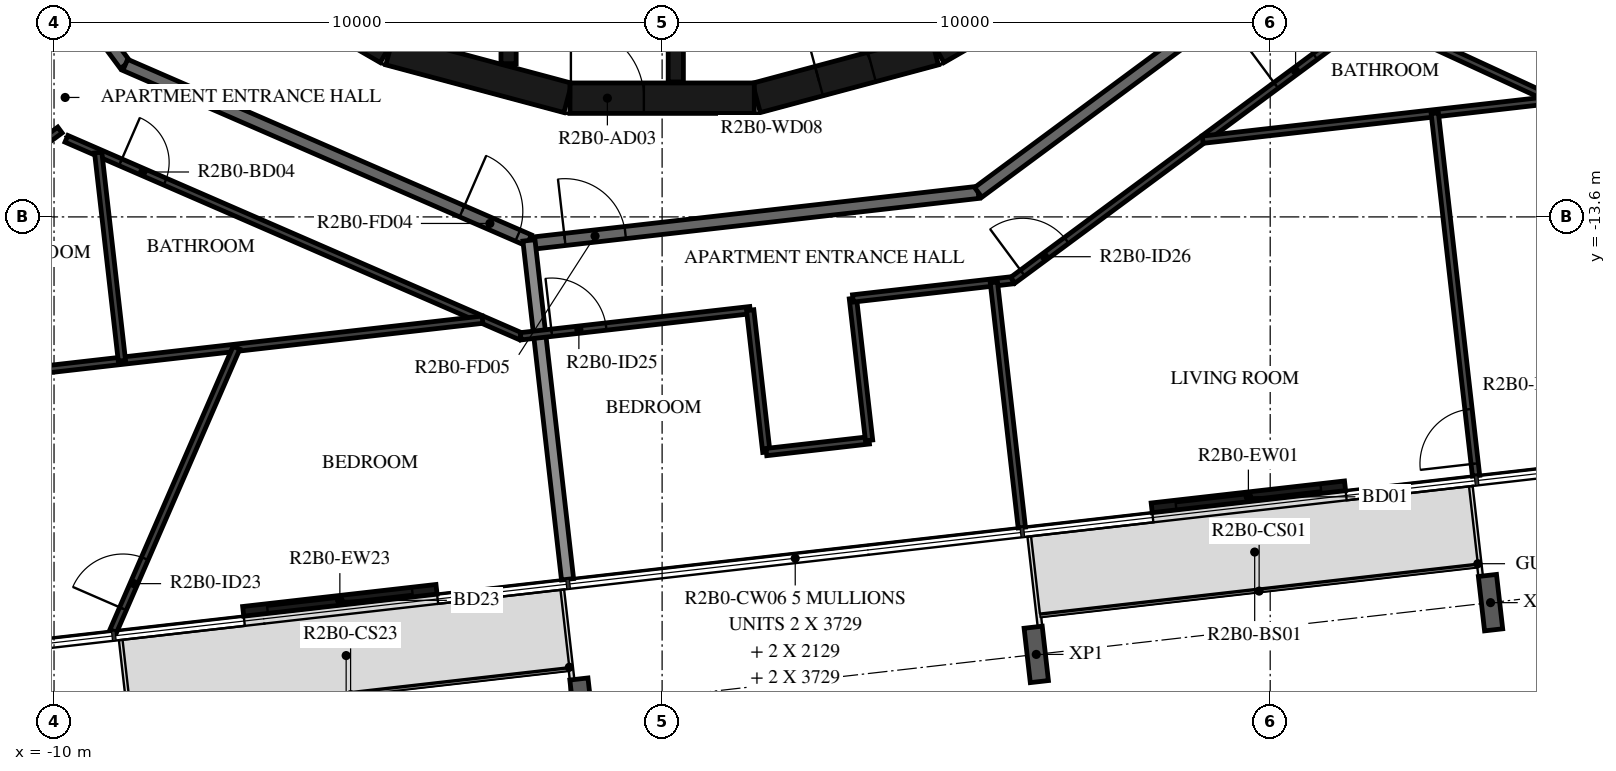
"""IFC4 building model, lengths in metres.
Left out: names, types, materials, properties, quantities, classifications, styles, units other than length and angle.
Written with IfcOpenShell. Run it as: python <this file> out.ifc"""

import sys

from ifc_helpers import new_model, si_unit, direction, frame, frame_2d, origin, origin_2d, place, context, subcontext, project, spatial, rectangle, i_section, extrude, element, fill, save


model = new_model("IFC4")
c1 = context("Model", 3, precision=1e-05, world=origin(), true_north=direction((0.0, 1.0)))
c2 = subcontext(c1, "Body", "Model", "MODEL_VIEW")
j1 = project(units=[si_unit("LENGTHUNIT", "METRE"), si_unit("PLANEANGLEUNIT", "RADIAN")], contexts=[c1])
p1 = place(None, origin())
s1 = spatial("IfcSite", under=j1, at=p1, CompositionType="ELEMENT")
p2 = place(p1, origin())
s2 = spatial("IfcBuilding", under=s1, at=p2, CompositionType="ELEMENT")
p3 = place(p2, frame((0.0, 0.0, 90.7)))
s3 = spatial("IfcBuildingStorey", under=s2, at=p3, CompositionType="ELEMENT", Elevation=90.7)
for number, where, z_axis, x_axis in (
    (1, (6.153, -20.795, -0.38), (0.0, 0.0, 1.0), (-0.994, -0.113, 0.0)),
    (2, (13.624, -19.944, -0.38), (0.0, 0.0, 1.0), (-0.994, -0.113, 0.0)),
    (3, (-1.317, -21.646, -0.38), (0.0, 0.0, 1.0), (-0.994, -0.113, 0.0)),
):
    element("IfcColumn", number, at=place(p3, frame(where, z_axis=z_axis, x_axis=x_axis)), inside=s3, PredefinedType="COLUMN", context=c2, shape_type="SweptSolid", body=[
        extrude(i_section(OverallWidth=0.3, OverallDepth=0.9, WebThickness=0.019, FlangeThickness=0.035, FilletRadius=0.03, at=origin_2d()), origin(), (0.0, 0.0, 1.0), 3.5),
    ])
p4 = place(p3, frame((-6.889, -20.086, 0.0), z_axis=(0.0, 0.0, 1.0), x_axis=(0.993578576686, 0.113144208648, 0.0)))
e4 = element("IfcWall", 4, at=p4, inside=s3, PredefinedType="STANDARD", context=c2, shape_type="SweptSolid", body=[
    extrude(rectangle(XDim=3.2, YDim=0.16, at=frame_2d((1.6, 0.0))), origin(), (0.0, 0.0, 1.0), 3.12),
])
p5 = place(p4, frame((0.4, 0.0, 0.0)))
e5 = element("IfcOpeningElement", 5, at=p5, cuts=e4, PredefinedType="OPENING", context=c2, shape_type="SweptSolid", body=[
    extrude(rectangle(XDim=2.4, YDim=2.4, at=frame_2d((1.2, 1.2))), frame((0.0, 0.09, 0.0), z_axis=(0.0, -1.0, 0.0), x_axis=(1.0, 0.0, 0.0)), (0.0, 0.0, 1.0), 0.18),
])
p6 = place(p3, frame((8.052, -18.384, 0.0), z_axis=(0.0, 0.0, 1.0), x_axis=(0.993569997097, 0.113219525124, 0.0)))
e6 = element("IfcWall", 6, at=p6, inside=s3, PredefinedType="STANDARD", context=c2, shape_type="SweptSolid", body=[
    extrude(rectangle(XDim=3.2, YDim=0.16, at=frame_2d((1.6, 0.0))), origin(), (0.0, 0.0, 1.0), 3.12),
])
p7 = place(p6, frame((0.4, 0.0, 0.0)))
e7 = element("IfcOpeningElement", 7, at=p7, cuts=e6, PredefinedType="OPENING", context=c2, shape_type="SweptSolid", body=[
    extrude(rectangle(XDim=2.4, YDim=2.4, at=frame_2d((1.2, 1.2))), frame((0.0, 0.09, 0.0), z_axis=(0.0, -1.0, 0.0), x_axis=(1.0, 0.0, 0.0)), (0.0, 0.0, 1.0), 0.18),
])
p8 = place(p3, frame((1.55, -11.643, 0.0), z_axis=(0.0, 0.0, 1.0), x_axis=(0.965948410781, 0.258734743916, 0.0)))
e8 = element("IfcWall", 8, at=p8, inside=s3, PredefinedType="SHEAR", context=c2, shape_type="SweptSolid", body=[
    extrude(rectangle(XDim=3.033, YDim=0.5, at=frame_2d((1.516, 0.0))), origin(), (0.0, 0.0, 1.0), 3.12),
])
p9 = place(p8, frame((1.066, 0.0, 0.0)))
e9 = element("IfcOpeningElement", 9, at=p9, cuts=e8, PredefinedType="OPENING", context=c2, shape_type="SweptSolid", body=[
    extrude(rectangle(XDim=0.9, YDim=2.1, at=frame_2d((0.45, 1.05))), frame((0.0, 0.26, 0.0), z_axis=(0.0, -1.0, 0.0), x_axis=(1.0, 0.0, 0.0)), (0.0, 0.0, 1.0), 0.52),
])
for number, where, z_axis, x_axis in (
    (10, (4.51, -10.845, 0.0), (0.0, 0.0, 1.0), (0.866, 0.5, 0.0)),
    (11, (-7.137, -9.329, 0.0), (0.0, 0.0, 1.0), (0.866, -0.5, 0.0)),
    (12, (-4.479, -10.858, 0.0), (0.0, 0.0, 1.0), (0.966, -0.259, 0.0)),
):
    element("IfcWall", number, at=place(p3, frame(where, z_axis=z_axis, x_axis=x_axis)), inside=s3, PredefinedType="SHEAR", context=c2, shape_type="SweptSolid", body=[
        extrude(rectangle(XDim=3.033, YDim=0.5, at=frame_2d((1.516, 0.0))), origin(), (0.0, 0.0, 1.0), 3.12),
    ])
p10 = place(p3, frame((-1.516, -11.647, 0.0), z_axis=(0.0, 0.0, 1.0), x_axis=(1.0, 0.0, 0.0)))
e13 = element("IfcWall", 13, at=p10, inside=s3, PredefinedType="SHEAR", context=c2, shape_type="SweptSolid", body=[
    extrude(rectangle(XDim=3.033, YDim=0.5, at=frame_2d((1.516, 0.0))), origin(), (0.0, 0.0, 1.0), 3.12),
])
p11 = place(p10, frame((0.016, 0.0, 0.0)))
e14 = element("IfcOpeningElement", 14, at=p11, cuts=e13, PredefinedType="OPENING", context=c2, shape_type="SweptSolid", body=[
    extrude(rectangle(XDim=1.2, YDim=2.1, at=frame_2d((0.6, 1.05))), frame((0.0, 0.26, 0.0), z_axis=(0.0, -1.0, 0.0), x_axis=(1.0, 0.0, 0.0)), (0.0, 0.0, 1.0), 0.52),
])
p12 = place(p3, frame((-2.525, -8.97, 0.0), z_axis=(0.0, 0.0, 1.0), x_axis=(0.0, -1.0, 0.0)))
e15 = element("IfcWall", 15, at=p12, inside=s3, PredefinedType="SHEAR", context=c2, shape_type="SweptSolid", body=[
    extrude(rectangle(XDim=2.11, YDim=0.25, at=frame_2d((1.055, 0.0))), origin(), (0.0, 0.0, 1.0), 3.12),
])
p13 = place(p3, frame((0.225, -8.97, 0.0), z_axis=(0.0, 0.0, 1.0), x_axis=(0.0, -1.0, 0.0)))
e16 = element("IfcWall", 16, at=p13, inside=s3, PredefinedType="SHEAR", context=c2, shape_type="SweptSolid", body=[
    extrude(rectangle(XDim=2.41, YDim=0.25, at=frame_2d((1.205, 0.0))), origin(), (0.0, 0.0, 1.0), 3.12),
])
p14 = place(p3, frame((-13.196, -5.198, 0.0), z_axis=(0.0, 0.0, 1.0), x_axis=(0.594805187394, -0.803869883159, 0.0)))
e17 = element("IfcWall", 17, at=p14, inside=s3, PredefinedType="STANDARD", context=c2, shape_type="SweptSolid", body=[
    extrude(rectangle(XDim=7.342, YDim=0.2, at=frame_2d((3.671, 0.0))), origin(), (0.0, 0.0, 1.0), 3.12),
])
p15 = place(p3, frame((-8.829, -11.1, 0.0), z_axis=(0.0, 0.0, 1.0), x_axis=(0.917063622491, -0.398740908742, 0.0)))
e18 = element("IfcWall", 18, at=p15, inside=s3, PredefinedType="STANDARD", context=c2, shape_type="SweptSolid", body=[
    extrude(rectangle(XDim=7.24, YDim=0.2, at=frame_2d((3.62, 0.0))), origin(), (0.0, 0.0, 1.0), 3.12),
])
p16 = place(p15, frame((6.04, 0.0, 0.0)))
e19 = element("IfcOpeningElement", 19, at=p16, cuts=e18, PredefinedType="OPENING", context=c2, shape_type="SweptSolid", body=[
    extrude(rectangle(XDim=1.0, YDim=2.1, at=frame_2d((0.5, 1.05))), frame((0.0, 0.11, 0.0), z_axis=(0.0, -1.0, 0.0), x_axis=(1.0, 0.0, 0.0)), (0.0, 0.0, 1.0), 0.22),
])
p17 = place(p3, frame((-2.096, -14.028, 0.0), z_axis=(0.0, 0.0, 1.0), x_axis=(0.993569170114, 0.113226782163, 0.0)))
e20 = element("IfcWall", 20, at=p17, inside=s3, PredefinedType="STANDARD", context=c2, shape_type="SweptSolid", body=[
    extrude(rectangle(XDim=7.342, YDim=0.2, at=frame_2d((3.671, 0.0))), origin(), (0.0, 0.0, 1.0), 3.12),
])
p18 = place(p17, frame((0.5, 0.0, 0.0)))
e21 = element("IfcOpeningElement", 21, at=p18, cuts=e20, PredefinedType="OPENING", context=c2, shape_type="SweptSolid", body=[
    extrude(rectangle(XDim=1.0, YDim=2.1, at=frame_2d((0.5, 1.05))), frame((0.0, 0.11, 0.0), z_axis=(0.0, -1.0, 0.0), x_axis=(1.0, 0.0, 0.0)), (0.0, 0.0, 1.0), 0.22),
])
p19 = place(p3, frame((5.198, -13.196, 0.0), z_axis=(0.0, 0.0, 1.0), x_axis=(0.803869883159, 0.594805187394, 0.0)))
e22 = element("IfcWall", 22, at=p19, inside=s3, PredefinedType="STANDARD", context=c2, shape_type="SweptSolid", body=[
    extrude(rectangle(XDim=7.342, YDim=0.2, at=frame_2d((3.671, 0.0))), origin(), (0.0, 0.0, 1.0), 3.12),
])
p20 = place(p3, frame((-1.555, -19.559, 0.0), z_axis=(0.0, 0.0, 1.0), x_axis=(-0.113221250863, 0.993569800443, 0.0)))
e23 = element("IfcWall", 23, at=p20, inside=s3, PredefinedType="STANDARD", context=c2, shape_type="SweptSolid", body=[
    extrude(rectangle(XDim=5.609, YDim=0.2, at=frame_2d((2.804, 0.0))), origin(), (0.0, 0.0, 1.0), 2.73),
])
p21 = place(p3, frame((-13.125, -14.555, 0.0), z_axis=(0.0, 0.0, 1.0), x_axis=(0.80389374229, 0.594772940799, 0.0)))
e24 = element("IfcWall", 24, at=p21, inside=s3, PredefinedType="PARTITIONING", context=c2, shape_type="SweptSolid", body=[
    extrude(rectangle(XDim=4.008, YDim=0.12, at=frame_2d((2.004, 0.0))), origin(), (0.0, 0.0, 1.0), 3.12),
])
p22 = place(p3, frame((-9.796, -12.315, 0.0), z_axis=(0.0, 0.0, 1.0), x_axis=(0.917059572812, -0.398750222463, 0.0)))
e25 = element("IfcWall", 25, at=p22, inside=s3, PredefinedType="PARTITIONING", context=c2, shape_type="SweptSolid", body=[
    extrude(rectangle(XDim=8.146, YDim=0.12, at=frame_2d((4.073, 0.0))), origin(), (0.0, 0.0, 1.0), 3.12),
])
p23 = place(p22, frame((0.969, 0.0, 0.0)))
e26 = element("IfcOpeningElement", 26, at=p23, cuts=e25, PredefinedType="OPENING", context=c2, shape_type="SweptSolid", body=[
    extrude(rectangle(XDim=0.8, YDim=2.1, at=frame_2d((0.4, 1.05))), frame((0.0, 0.07, 0.0), z_axis=(0.0, -1.0, 0.0), x_axis=(1.0, 0.0, 0.0)), (0.0, 0.0, 1.0), 0.14),
])
p24 = place(p3, frame((-2.326, -15.563, 0.0), z_axis=(0.0, 0.0, 1.0), x_axis=(0.993575068384, 0.113175012641, 0.0)))
e27 = element("IfcWall", 27, at=p24, inside=s3, PredefinedType="PARTITIONING", context=c2, shape_type="SweptSolid", body=[
    extrude(rectangle(XDim=3.799, YDim=0.12, at=frame_2d((1.899, 0.0))), origin(), (0.0, 0.0, 1.0), 3.12),
])
p25 = place(p24, frame((0.513, 0.0, 0.0)))
e28 = element("IfcOpeningElement", 28, at=p25, cuts=e27, PredefinedType="OPENING", context=c2, shape_type="SweptSolid", body=[
    extrude(rectangle(XDim=0.9, YDim=2.1, at=frame_2d((0.45, 1.05))), frame((0.0, 0.07, 0.0), z_axis=(0.0, -1.0, 0.0), x_axis=(1.0, 0.0, 0.0)), (0.0, 0.0, 1.0), 0.14),
])
p26 = place(p3, frame((-17.437, -16.94, 0.0), z_axis=(0.0, 0.0, 1.0), x_axis=(0.993573314119, 0.113190412448, 0.0)))
e29 = element("IfcWall", 29, at=p26, inside=s3, PredefinedType="PARTITIONING", context=c2, shape_type="SweptSolid", body=[
    extrude(rectangle(XDim=14.576, YDim=0.12, at=frame_2d((7.288, 0.0))), origin(), (0.0, 0.0, 1.0), 3.12),
])
p27 = place(p26, frame((3.201, 0.0, 0.0)))
e30 = element("IfcOpeningElement", 30, at=p27, cuts=e29, PredefinedType="OPENING", context=c2, shape_type="SweptSolid", body=[
    extrude(rectangle(XDim=0.9, YDim=2.1, at=frame_2d((0.45, 1.05))), frame((0.0, 0.07, 0.0), z_axis=(0.0, -1.0, 0.0), x_axis=(1.0, 0.0, 0.0)), (0.0, 0.0, 1.0), 0.14),
])
p28 = place(p26, frame((0.2, 0.0, 0.0)))
e31 = element("IfcOpeningElement", 31, at=p28, cuts=e29, PredefinedType="OPENING", context=c2, shape_type="SweptSolid", body=[
    extrude(rectangle(XDim=0.9, YDim=2.1, at=frame_2d((0.45, 1.05))), frame((0.0, 0.07, 0.0), z_axis=(0.0, -1.0, 0.0), x_axis=(1.0, 0.0, 0.0)), (0.0, 0.0, 1.0), 0.14),
])
p29 = place(p3, frame((-8.884, -15.966, 0.0), z_axis=(0.0, 0.0, 1.0), x_axis=(-0.113230836929, 0.993568708026, 0.0)))
e32 = element("IfcWall", 32, at=p29, inside=s3, PredefinedType="PARTITIONING", context=c2, shape_type="SweptSolid", body=[
    extrude(rectangle(XDim=3.446, YDim=0.12, at=frame_2d((1.723, 0.0))), origin(), (0.0, 0.0, 1.0), 3.12),
])
p30 = place(p3, frame((-9.026, -20.41, 0.0), z_axis=(0.0, 0.0, 1.0), x_axis=(0.398750711167, 0.917059360316, 0.0)))
e33 = element("IfcWall", 33, at=p30, inside=s3, PredefinedType="PARTITIONING", context=c2, shape_type="SweptSolid", body=[
    extrude(rectangle(XDim=5.081, YDim=0.12, at=frame_2d((2.54, 0.0))), origin(), (0.0, 0.0, 1.0), 3.12),
])
p31 = place(p30, frame((0.4, 0.0, 0.0)))
e34 = element("IfcOpeningElement", 34, at=p31, cuts=e33, PredefinedType="OPENING", context=c2, shape_type="SweptSolid", body=[
    extrude(rectangle(XDim=0.9, YDim=2.1, at=frame_2d((0.45, 1.05))), frame((0.0, 0.07, 0.0), z_axis=(0.0, -1.0, 0.0), x_axis=(1.0, 0.0, 0.0)), (0.0, 0.0, 1.0), 0.14),
])
p32 = place(p3, frame((1.448, -15.133, 0.0), z_axis=(0.0, 0.0, 1.0), x_axis=(0.113180189053, -0.993574478741, 0.0)))
e35 = element("IfcWall", 35, at=p32, inside=s3, PredefinedType="PARTITIONING", context=c2, shape_type="SweptSolid", body=[
    extrude(rectangle(XDim=2.349, YDim=0.12, at=frame_2d((1.175, 0.0))), origin(), (0.0, 0.0, 1.0), 3.12),
])
p33 = place(p3, frame((1.714, -17.467, 0.0), z_axis=(0.0, 0.0, 1.0), x_axis=(0.993577030812, 0.113157782957, 0.0)))
e36 = element("IfcWall", 36, at=p33, inside=s3, PredefinedType="PARTITIONING", context=c2, shape_type="SweptSolid", body=[
    extrude(rectangle(XDim=1.7, YDim=0.12, at=frame_2d((0.85, 0.0))), origin(), (0.0, 0.0, 1.0), 3.12),
])
p34 = place(p3, frame((3.404, -17.275, 0.0), z_axis=(0.0, 0.0, 1.0), x_axis=(-0.113180189053, 0.993574478741, 0.0)))
e37 = element("IfcWall", 37, at=p34, inside=s3, PredefinedType="PARTITIONING", context=c2, shape_type="SweptSolid", body=[
    extrude(rectangle(XDim=2.349, YDim=0.12, at=frame_2d((1.175, 0.0))), origin(), (0.0, 0.0, 1.0), 3.12),
])
p35 = place(p3, frame((3.138, -14.941, 0.0), z_axis=(0.0, 0.0, 1.0), x_axis=(0.99356355736, 0.113276023437, 0.0)))
e38 = element("IfcWall", 38, at=p35, inside=s3, PredefinedType="PARTITIONING", context=c2, shape_type="SweptSolid", body=[
    extrude(rectangle(XDim=2.647, YDim=0.12, at=frame_2d((1.323, 0.0))), origin(), (0.0, 0.0, 1.0), 3.12),
])
p36 = place(p3, frame((5.767, -14.641, 0.0), z_axis=(0.0, 0.0, 1.0), x_axis=(0.803867427863, 0.594808505673, 0.0)))
e39 = element("IfcWall", 39, at=p36, inside=s3, PredefinedType="PARTITIONING", context=c2, shape_type="SweptSolid", body=[
    extrude(rectangle(XDim=7.316, YDim=0.12, at=frame_2d((3.658, 0.0))), origin(), (0.0, 0.0, 1.0), 3.12),
])
p37 = place(p36, frame((0.2, 0.0, 0.0)))
e40 = element("IfcOpeningElement", 40, at=p37, cuts=e39, PredefinedType="OPENING", context=c2, shape_type="SweptSolid", body=[
    extrude(rectangle(XDim=0.9, YDim=2.1, at=frame_2d((0.45, 1.05))), frame((0.0, 0.07, 0.0), z_axis=(0.0, -1.0, 0.0), x_axis=(1.0, 0.0, 0.0)), (0.0, 0.0, 1.0), 0.14),
])
p38 = place(p36, frame((5.385, 0.0, 0.0)))
e41 = element("IfcOpeningElement", 41, at=p38, cuts=e39, PredefinedType="OPENING", context=c2, shape_type="SweptSolid", body=[
    extrude(rectangle(XDim=0.8, YDim=2.1, at=frame_2d((0.4, 1.05))), frame((0.0, 0.07, 0.0), z_axis=(0.0, -1.0, 0.0), x_axis=(1.0, 0.0, 0.0)), (0.0, 0.0, 1.0), 0.14),
])
p39 = place(p3, frame((11.649, -10.289, 0.0), z_axis=(0.0, 0.0, 1.0), x_axis=(0.9079269461, -0.419128453514, 0.0)))
e42 = element("IfcWall", 42, at=p39, inside=s3, PredefinedType="PARTITIONING", context=c2, shape_type="SweptSolid", body=[
    extrude(rectangle(XDim=3.304, YDim=0.12, at=frame_2d((1.652, 0.0))), origin(), (0.0, 0.0, 1.0), 3.12),
])
p40 = place(p3, frame((5.915, -18.708, 0.0), z_axis=(0.0, 0.0, 1.0), x_axis=(-0.113244511591, 0.993567149515, 0.0)))
e43 = element("IfcWall", 43, at=p40, inside=s3, PredefinedType="PARTITIONING", context=c2, shape_type="SweptSolid", body=[
    extrude(rectangle(XDim=4.057, YDim=0.12, at=frame_2d((2.029, 0.0))), origin(), (0.0, 0.0, 1.0), 2.73),
])
p41 = place(p3, frame((14.649, -11.674, 0.0), z_axis=(0.0, 0.0, 1.0), x_axis=(-0.993573746873, -0.113186613721, 0.0)))
e44 = element("IfcWall", 44, at=p41, inside=s3, PredefinedType="PARTITIONING", context=c2, shape_type="SweptSolid", body=[
    extrude(rectangle(XDim=5.796, YDim=0.12, at=frame_2d((2.898, 0.0))), origin(), (0.0, 0.0, 1.0), 3.12),
])
p42 = place(p3, frame((13.386, -17.857, 0.0), z_axis=(0.0, 0.0, 1.0), x_axis=(-0.113200012983, 0.993572220355, 0.0)))
e45 = element("IfcWall", 45, at=p42, inside=s3, PredefinedType="PARTITIONING", context=c2, shape_type="SweptSolid", body=[
    extrude(rectangle(XDim=6.0, YDim=0.12, at=frame_2d((3.0, 0.0))), origin(), (0.0, 0.0, 1.0), 2.73),
])
p43 = place(p42, frame((0.2, 0.0, 0.0)))
e46 = element("IfcOpeningElement", 46, at=p43, cuts=e45, PredefinedType="OPENING", context=c2, shape_type="SweptSolid", body=[
    extrude(rectangle(XDim=0.9, YDim=2.1, at=frame_2d((0.45, 1.05))), frame((0.0, 0.07, 0.0), z_axis=(0.0, -1.0, 0.0), x_axis=(1.0, 0.0, 0.0)), (0.0, 0.0, 1.0), 0.14),
])
p44 = place(p5, origin())
e47 = element("IfcDoor", 47, at=p44, inside=s3, OperationType="DOUBLE_DOOR_SLIDING", PredefinedType="DOOR", context=c2, shape_type="SweptSolid", body=[
    extrude(rectangle(XDim=2.4, YDim=2.4, at=frame_2d((1.2, 1.2))), frame((0.0, 0.025, 0.0), z_axis=(0.0, -1.0, 0.0), x_axis=(1.0, 0.0, 0.0)), (0.0, 0.0, 1.0), 0.05),
])
fill(e5, e47)
p45 = place(p7, origin())
e48 = element("IfcDoor", 48, at=p45, inside=s3, OperationType="DOUBLE_DOOR_SLIDING", PredefinedType="DOOR", context=c2, shape_type="SweptSolid", body=[
    extrude(rectangle(XDim=2.4, YDim=2.4, at=frame_2d((1.2, 1.2))), frame((0.0, 0.025, 0.0), z_axis=(0.0, -1.0, 0.0), x_axis=(1.0, 0.0, 0.0)), (0.0, 0.0, 1.0), 0.05),
])
fill(e7, e48)
p46 = place(p11, origin())
e49 = element("IfcDoor", 49, at=p46, inside=s3, OperationType="SINGLE_SWING_RIGHT", PredefinedType="DOOR", context=c2, shape_type="SweptSolid", body=[
    extrude(rectangle(XDim=1.2, YDim=2.1, at=frame_2d((0.6, 1.05))), frame((0.0, 0.025, 0.0), z_axis=(0.0, -1.0, 0.0), x_axis=(1.0, 0.0, 0.0)), (0.0, 0.0, 1.0), 0.05),
])
fill(e14, e49)
p47 = place(p9, origin())
e50 = element("IfcDoor", 50, at=p47, inside=s3, OperationType="SINGLE_SWING_LEFT", PredefinedType="DOOR", context=c2, shape_type="SweptSolid", body=[
    extrude(rectangle(XDim=0.9, YDim=2.1, at=frame_2d((0.45, 1.05))), frame((0.0, 0.025, 0.0), z_axis=(0.0, -1.0, 0.0), x_axis=(1.0, 0.0, 0.0)), (0.0, 0.0, 1.0), 0.05),
])
fill(e9, e50)
p48 = place(p16, origin())
e51 = element("IfcDoor", 51, at=p48, inside=s3, OperationType="SINGLE_SWING_LEFT", PredefinedType="DOOR", context=c2, shape_type="SweptSolid", body=[
    extrude(rectangle(XDim=1.0, YDim=2.1, at=frame_2d((0.5, 1.05))), frame((0.0, 0.025, 0.0), z_axis=(0.0, -1.0, 0.0), x_axis=(1.0, 0.0, 0.0)), (0.0, 0.0, 1.0), 0.05),
])
fill(e19, e51)
p49 = place(p23, origin())
e52 = element("IfcDoor", 52, at=p49, inside=s3, OperationType="SINGLE_SWING_LEFT", PredefinedType="DOOR", context=c2, shape_type="SweptSolid", body=[
    extrude(rectangle(XDim=0.8, YDim=2.1, at=frame_2d((0.4, 1.05))), frame((0.0, 0.025, 0.0), z_axis=(0.0, -1.0, 0.0), x_axis=(1.0, 0.0, 0.0)), (0.0, 0.0, 1.0), 0.05),
])
fill(e26, e52)
p50 = place(p31, origin())
e53 = element("IfcDoor", 53, at=p50, inside=s3, OperationType="SINGLE_SWING_RIGHT", PredefinedType="DOOR", context=c2, shape_type="SweptSolid", body=[
    extrude(rectangle(XDim=0.9, YDim=2.1, at=frame_2d((0.45, 1.05))), frame((0.0, 0.025, 0.0), z_axis=(0.0, -1.0, 0.0), x_axis=(1.0, 0.0, 0.0)), (0.0, 0.0, 1.0), 0.05),
])
fill(e34, e53)
p51 = place(p18, origin())
e54 = element("IfcDoor", 54, at=p51, inside=s3, OperationType="SINGLE_SWING_LEFT", PredefinedType="DOOR", context=c2, shape_type="SweptSolid", body=[
    extrude(rectangle(XDim=1.0, YDim=2.1, at=frame_2d((0.5, 1.05))), frame((0.0, 0.025, 0.0), z_axis=(0.0, -1.0, 0.0), x_axis=(1.0, 0.0, 0.0)), (0.0, 0.0, 1.0), 0.05),
])
fill(e21, e54)
p52 = place(p25, origin())
e55 = element("IfcDoor", 55, at=p52, inside=s3, OperationType="SINGLE_SWING_LEFT", PredefinedType="DOOR", context=c2, shape_type="SweptSolid", body=[
    extrude(rectangle(XDim=0.9, YDim=2.1, at=frame_2d((0.45, 1.05))), frame((0.0, 0.025, 0.0), z_axis=(0.0, -1.0, 0.0), x_axis=(1.0, 0.0, 0.0)), (0.0, 0.0, 1.0), 0.05),
])
fill(e28, e55)
p53 = place(p37, origin())
e56 = element("IfcDoor", 56, at=p53, inside=s3, OperationType="SINGLE_SWING_RIGHT", PredefinedType="DOOR", context=c2, shape_type="SweptSolid", body=[
    extrude(rectangle(XDim=0.9, YDim=2.1, at=frame_2d((0.45, 1.05))), frame((0.0, 0.025, 0.0), z_axis=(0.0, -1.0, 0.0), x_axis=(1.0, 0.0, 0.0)), (0.0, 0.0, 1.0), 0.05),
])
fill(e40, e56)
p54 = place(p38, origin())
e57 = element("IfcDoor", 57, at=p54, inside=s3, OperationType="SINGLE_SWING_RIGHT", PredefinedType="DOOR", context=c2, shape_type="SweptSolid", body=[
    extrude(rectangle(XDim=0.8, YDim=2.1, at=frame_2d((0.4, 1.05))), frame((0.0, 0.025, 0.0), z_axis=(0.0, -1.0, 0.0), x_axis=(1.0, 0.0, 0.0)), (0.0, 0.0, 1.0), 0.05),
])
fill(e41, e57)
p55 = place(p43, origin())
e58 = element("IfcDoor", 58, at=p55, inside=s3, OperationType="SINGLE_SWING_RIGHT", PredefinedType="DOOR", context=c2, shape_type="SweptSolid", body=[
    extrude(rectangle(XDim=0.9, YDim=2.1, at=frame_2d((0.45, 1.05))), frame((0.0, 0.025, 0.0), z_axis=(0.0, -1.0, 0.0), x_axis=(1.0, 0.0, 0.0)), (0.0, 0.0, 1.0), 0.05),
])
fill(e46, e58)
save(model, sys.argv[1])
